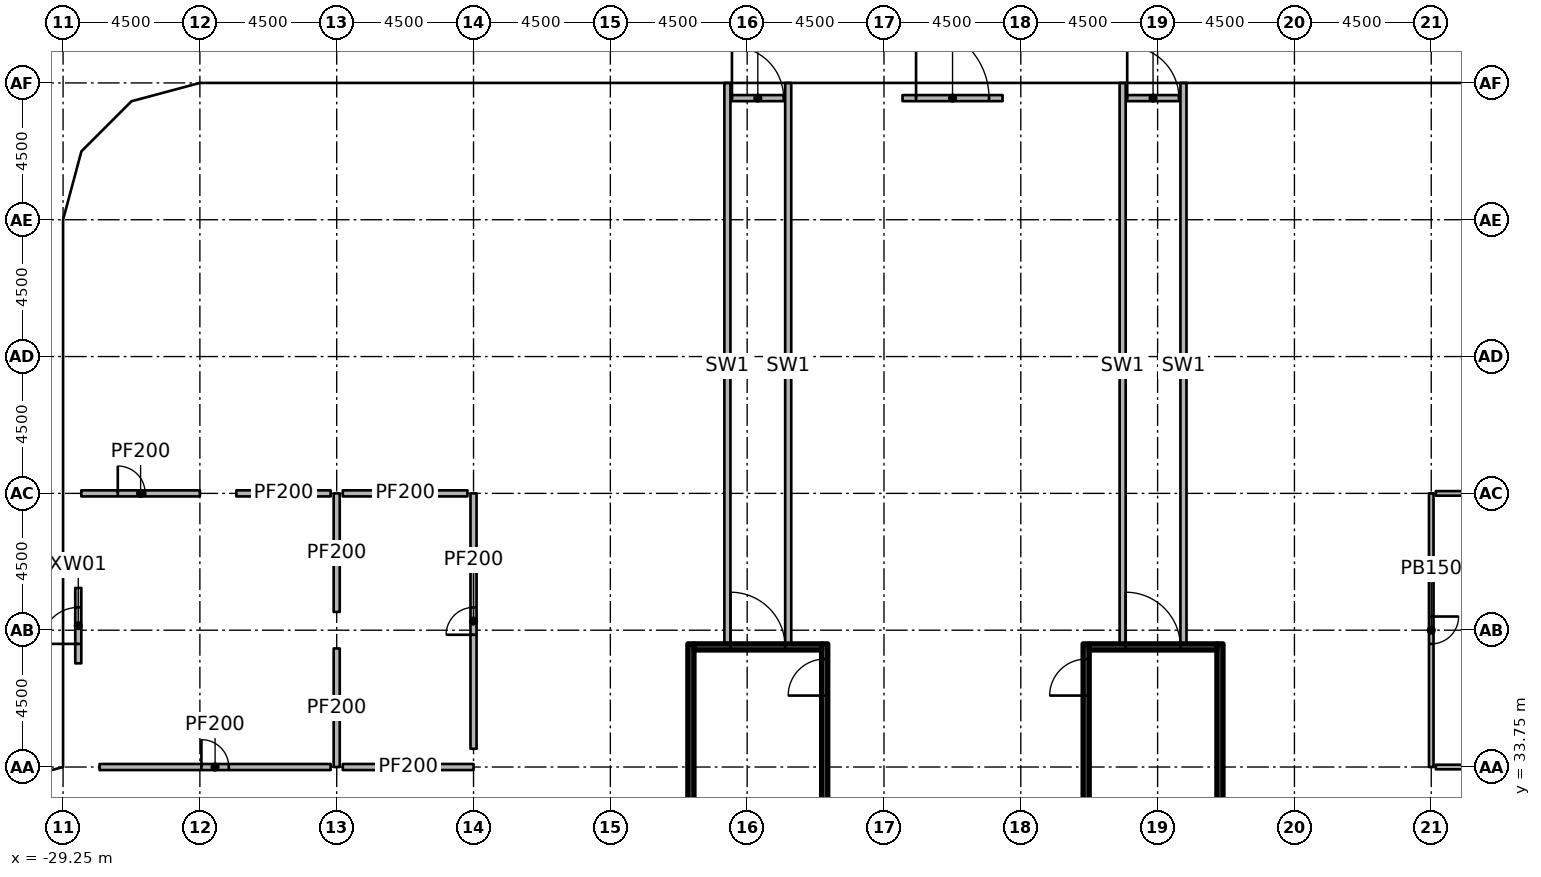
"""IFC4 building model, lengths in metres.
Left out: names, types, materials, properties, quantities, classifications, styles, units other than length and angle.
Written with IfcOpenShell. Run it as: python <this file> out.ifc"""

import sys

from ifc_helpers import new_model, si_unit, direction, frame, frame_2d, origin, origin_2d, place, context, subcontext, project, spatial, rectangle, extrude, element, fill, save


model = new_model("IFC4")
c1 = context("Model", 3, precision=1e-05, world=origin(), true_north=direction((0.0, 1.0)))
c2 = subcontext(c1, "Body", "Model", "MODEL_VIEW")
j1 = project(units=[si_unit("LENGTHUNIT", "METRE"), si_unit("PLANEANGLEUNIT", "RADIAN")], contexts=[c1])
p1 = place(None, origin())
s1 = spatial("IfcSite", under=j1, at=p1, CompositionType="ELEMENT")
p2 = place(p1, origin())
s2 = spatial("IfcBuilding", under=s1, at=p2, CompositionType="ELEMENT")
p3 = place(p2, origin())
s3 = spatial("IfcBuildingStorey", under=s2, at=p3, CompositionType="ELEMENT", Elevation=0.0)
for number, where, z_axis, x_axis in (
    (1, (-28.65, 33.15, 0.0), (0.0, 0.0, 1.0), (1.0, 0.0, 0.0)),
    (2, (-28.65, 47.25, 0.0), (0.0, 0.0, 1.0), (1.0, 0.0, 0.0)),
    (3, (-24.15, 42.75, 0.0), (0.0, 0.0, 1.0), (1.0, 0.0, 0.0)),
    (4, (-24.75, 55.47, 0.0), (0.0, 0.0, 1.0), (1.0, 0.0, 0.0)),
    (5, (-19.65, 38.25, 0.0), (0.0, 0.0, 1.0), (1.0, 0.0, 0.0)),
    (6, (-20.25, 50.97, 0.0), (0.0, 0.0, 1.0), (1.0, 0.0, 0.0)),
    (7, (-15.15, 33.75, 0.0), (0.0, 0.0, 1.0), (1.0, 0.0, 0.0)),
    (8, (-15.75, 46.47, 0.0), (0.0, 0.0, 1.0), (1.0, 0.0, 0.0)),
    (9, (-11.25, 41.97, 0.0), (0.0, 0.0, 1.0), (1.0, 0.0, 0.0)),
    (10, (-11.25, 55.65, 0.0), (0.0, 0.0, 1.0), (1.0, 0.0, 0.0)),
    (11, (-2.25, 33.11, 0.0), (0.0, 0.0, 1.0), (1.0, 0.0, 0.0)),
    (12, (-2.25, 46.65, 0.0), (0.0, 0.0, 1.0), (1.0, 0.0, 0.0)),
    (13, (2.25, 33.11, 0.0), (0.0, 0.0, 1.0), (1.0, 0.0, 0.0)),
    (14, (2.25, 42.15, 0.0), (0.0, 0.0, 1.0), (1.0, 0.0, 0.0)),
    (15, (2.25, 55.65, 0.0), (0.0, 0.0, 1.0), (1.0, 0.0, 0.0)),
    (16, (10.47, 33.75, 0.0), (0.0, 0.0, 1.0), (1.0, 0.0, 0.0)),
    (17, (11.25, 46.65, 0.0), (0.0, 0.0, 1.0), (1.0, 0.0, 0.0)),
    (18, (15.75, 55.65, 0.0), (0.0, 0.0, 1.0), (1.0, 0.0, 0.0)),
):
    element("IfcColumn", number, at=place(p3, frame(where, z_axis=z_axis, x_axis=x_axis)), inside=s3, PredefinedType="COLUMN", context=c2, shape_type="SweptSolid", body=[
        extrude(rectangle(XDim=1.2, YDim=1.2, at=origin_2d()), origin(), (0.0, 0.0, 1.0), 6.55),
    ])
p4 = place(p3, frame((-1.64, 55.75, 0.0), z_axis=(0.0, 0.0, 1.0), x_axis=(1.0, 0.0, 0.0)))
e19 = element("IfcWall", 19, at=p4, inside=s3, PredefinedType="SOLIDWALL", context=c2, shape_type="SweptSolid", body=[
    extrude(rectangle(XDim=3.29, YDim=0.2, at=frame_2d((1.645, 0.0))), origin(), (0.0, 0.0, 1.0), 5.6),
])
p5 = place(p4, frame((0.445, 0.0, 0.0)))
e20 = element("IfcOpeningElement", 20, at=p5, cuts=e19, PredefinedType="OPENING", context=c2, shape_type="SweptSolid", body=[
    extrude(rectangle(XDim=2.4, YDim=2.7, at=frame_2d((1.2, 1.35))), frame((0.0, 0.11, 0.0), z_axis=(0.0, -1.0, 0.0), x_axis=(1.0, 0.0, 0.0)), (0.0, 0.0, 1.0), 0.22),
])
p6 = place(p3, frame((-28.75, 37.16, 0.0), z_axis=(0.0, 0.0, 1.0), x_axis=(0.0, 1.0, 0.0)))
e21 = element("IfcWall", 21, at=p6, inside=s3, PredefinedType="SOLIDWALL", context=c2, shape_type="SweptSolid", body=[
    extrude(rectangle(XDim=2.48, YDim=0.2, at=frame_2d((1.24, 0.0))), origin(), (0.0, 0.0, 1.0), 5.6),
])
p7 = place(p6, frame((0.64, 0.0, 0.0)))
e22 = element("IfcOpeningElement", 22, at=p7, cuts=e21, PredefinedType="OPENING", context=c2, shape_type="SweptSolid", body=[
    extrude(rectangle(XDim=1.2, YDim=2.1, at=frame_2d((0.6, 1.05))), frame((0.0, 0.11, 0.0), z_axis=(0.0, -1.0, 0.0), x_axis=(1.0, 0.0, 0.0)), (0.0, 0.0, 1.0), 0.22),
])
p8 = place(p3, frame((-7.3, 55.75, 0.0), z_axis=(0.0, 0.0, 1.0), x_axis=(1.0, 0.0, 0.0)))
e23 = element("IfcWall", 23, at=p8, inside=s3, PredefinedType="SOLIDWALL", context=c2, shape_type="SweptSolid", body=[
    extrude(rectangle(XDim=1.8, YDim=0.2, at=frame_2d((0.9, 0.0))), origin(), (0.0, 0.0, 1.0), 3.0),
])
p9 = place(p8, frame((0.05, 0.0, 0.0)))
e24 = element("IfcOpeningElement", 24, at=p9, cuts=e23, PredefinedType="OPENING", context=c2, shape_type="SweptSolid", body=[
    extrude(rectangle(XDim=1.7, YDim=2.1, at=frame_2d((0.85, 1.05))), frame((0.0, 0.11, 0.0), z_axis=(0.0, -1.0, 0.0), x_axis=(1.0, 0.0, 0.0)), (0.0, 0.0, 1.0), 0.22),
])
p10 = place(p3, frame((5.7, 55.75, 0.0), z_axis=(0.0, 0.0, 1.0), x_axis=(1.0, 0.0, 0.0)))
e25 = element("IfcWall", 25, at=p10, inside=s3, PredefinedType="SOLIDWALL", context=c2, shape_type="SweptSolid", body=[
    extrude(rectangle(XDim=1.8, YDim=0.2, at=frame_2d((0.9, 0.0))), origin(), (0.0, 0.0, 1.0), 3.0),
])
p11 = place(p10, frame((0.05, 0.0, 0.0)))
e26 = element("IfcOpeningElement", 26, at=p11, cuts=e25, PredefinedType="OPENING", context=c2, shape_type="SweptSolid", body=[
    extrude(rectangle(XDim=1.7, YDim=2.1, at=frame_2d((0.85, 1.05))), frame((0.0, 0.11, 0.0), z_axis=(0.0, -1.0, 0.0), x_axis=(1.0, 0.0, 0.0)), (0.0, 0.0, 1.0), 0.22),
])
p12 = place(p3, frame((-8.6, 29.8, 0.0), z_axis=(0.0, 0.0, 1.0), x_axis=(0.0, 1.0, 0.0)))
e27 = element("IfcWall", 27, at=p12, inside=s3, PredefinedType="SHEAR", context=c2, shape_type="SweptSolid", body=[
    extrude(rectangle(XDim=8.0, YDim=0.2, at=frame_2d((4.0, 0.0))), origin(), (0.0, 0.0, 1.0), 6.55),
])
p13 = place(p3, frame((-4.2, 29.8, 0.0), z_axis=(0.0, 0.0, 1.0), x_axis=(0.0, 1.0, 0.0)))
e28 = element("IfcWall", 28, at=p13, inside=s3, PredefinedType="SHEAR", context=c2, shape_type="SweptSolid", body=[
    extrude(rectangle(XDim=8.0, YDim=0.2, at=frame_2d((4.0, 0.0))), origin(), (0.0, 0.0, 1.0), 6.55),
])
p14 = place(p13, frame((6.3, 0.0, 0.0)))
e29 = element("IfcOpeningElement", 29, at=p14, cuts=e28, PredefinedType="OPENING", context=c2, shape_type="SweptSolid", body=[
    extrude(rectangle(XDim=1.2, YDim=2.1, at=frame_2d((0.6, 1.05))), frame((0.0, 0.11, 0.0), z_axis=(0.0, -1.0, 0.0), x_axis=(1.0, 0.0, 0.0)), (0.0, 0.0, 1.0), 0.22),
])
p15 = place(p3, frame((-8.5, 37.7, 0.0), z_axis=(0.0, 0.0, 1.0), x_axis=(1.0, 0.0, 0.0)))
e30 = element("IfcWall", 30, at=p15, inside=s3, PredefinedType="SHEAR", context=c2, shape_type="SweptSolid", body=[
    extrude(rectangle(XDim=4.2, YDim=0.2, at=frame_2d((2.1, 0.0))), origin(), (0.0, 0.0, 1.0), 6.55),
])
p16 = place(p15, frame((1.2, 0.0, 0.0)))
e31 = element("IfcOpeningElement", 31, at=p16, cuts=e30, PredefinedType="OPENING", context=c2, shape_type="SweptSolid", body=[
    extrude(rectangle(XDim=1.8, YDim=2.1, at=frame_2d((0.9, 1.05))), frame((0.0, 0.11, 0.0), z_axis=(0.0, -1.0, 0.0), x_axis=(1.0, 0.0, 0.0)), (0.0, 0.0, 1.0), 0.22),
])
for number, where, z_axis, x_axis in (
    (32, (-7.4, 37.6, 0.0), (0.0, 0.0, 1.0), (0.0, 1.0, 0.0)),
    (33, (-5.4, 37.6, 0.0), (0.0, 0.0, 1.0), (0.0, 1.0, 0.0)),
):
    element("IfcWall", number, at=place(p3, frame(where, z_axis=z_axis, x_axis=x_axis)), inside=s3, PredefinedType="PARTITIONING", context=c2, shape_type="SweptSolid", body=[
        extrude(rectangle(XDim=18.65, YDim=0.2, at=frame_2d((9.325, 0.0))), origin(), (0.0, 0.0, 1.0), 6.55),
    ])
p17 = place(p3, frame((4.4, 29.8, 0.0), z_axis=(0.0, 0.0, 1.0), x_axis=(0.0, 1.0, 0.0)))
e34 = element("IfcWall", 34, at=p17, inside=s3, PredefinedType="SHEAR", context=c2, shape_type="SweptSolid", body=[
    extrude(rectangle(XDim=8.0, YDim=0.2, at=frame_2d((4.0, 0.0))), origin(), (0.0, 0.0, 1.0), 6.55),
])
p18 = place(p17, frame((6.3, 0.0, 0.0)))
e35 = element("IfcOpeningElement", 35, at=p18, cuts=e34, PredefinedType="OPENING", context=c2, shape_type="SweptSolid", body=[
    extrude(rectangle(XDim=1.2, YDim=2.1, at=frame_2d((0.6, 1.05))), frame((0.0, 0.11, 0.0), z_axis=(0.0, -1.0, 0.0), x_axis=(1.0, 0.0, 0.0)), (0.0, 0.0, 1.0), 0.22),
])
p19 = place(p3, frame((8.8, 29.8, 0.0), z_axis=(0.0, 0.0, 1.0), x_axis=(0.0, 1.0, 0.0)))
e36 = element("IfcWall", 36, at=p19, inside=s3, PredefinedType="SHEAR", context=c2, shape_type="SweptSolid", body=[
    extrude(rectangle(XDim=8.0, YDim=0.2, at=frame_2d((4.0, 0.0))), origin(), (0.0, 0.0, 1.0), 6.55),
])
p20 = place(p3, frame((4.5, 37.7, 0.0), z_axis=(0.0, 0.0, 1.0), x_axis=(1.0, 0.0, 0.0)))
e37 = element("IfcWall", 37, at=p20, inside=s3, PredefinedType="SHEAR", context=c2, shape_type="SweptSolid", body=[
    extrude(rectangle(XDim=4.2, YDim=0.2, at=frame_2d((2.1, 0.0))), origin(), (0.0, 0.0, 1.0), 6.55),
])
p21 = place(p20, frame((1.2, 0.0, 0.0)))
e38 = element("IfcOpeningElement", 38, at=p21, cuts=e37, PredefinedType="OPENING", context=c2, shape_type="SweptSolid", body=[
    extrude(rectangle(XDim=1.8, YDim=2.1, at=frame_2d((0.9, 1.05))), frame((0.0, 0.11, 0.0), z_axis=(0.0, -1.0, 0.0), x_axis=(1.0, 0.0, 0.0)), (0.0, 0.0, 1.0), 0.22),
])
for number, where, z_axis, x_axis in (
    (39, (5.6, 37.6, 0.0), (0.0, 0.0, 1.0), (0.0, 1.0, 0.0)),
    (40, (7.6, 37.6, 0.0), (0.0, 0.0, 1.0), (0.0, 1.0, 0.0)),
):
    element("IfcWall", number, at=place(p3, frame(where, z_axis=z_axis, x_axis=x_axis)), inside=s3, PredefinedType="PARTITIONING", context=c2, shape_type="SweptSolid", body=[
        extrude(rectangle(XDim=18.65, YDim=0.2, at=frame_2d((9.325, 0.0))), origin(), (0.0, 0.0, 1.0), 6.55),
    ])
p22 = place(p3, frame((-15.75, 34.35, 0.0), z_axis=(0.0, 0.0, 1.0), x_axis=(0.0, 1.0, 0.0)))
e41 = element("IfcWall", 41, at=p22, inside=s3, PredefinedType="PARTITIONING", context=c2, shape_type="SweptSolid", body=[
    extrude(rectangle(XDim=8.4, YDim=0.2, at=frame_2d((4.2, 0.0))), origin(), (0.0, 0.0, 1.0), 6.55),
])
p23 = place(p22, frame((3.75, 0.0, 0.0)))
e42 = element("IfcOpeningElement", 42, at=p23, cuts=e41, PredefinedType="OPENING", context=c2, shape_type="SweptSolid", body=[
    extrude(rectangle(XDim=0.9, YDim=2.1, at=frame_2d((0.45, 1.05))), frame((0.0, 0.11, 0.0), z_axis=(0.0, -1.0, 0.0), x_axis=(1.0, 0.0, 0.0)), (0.0, 0.0, 1.0), 0.22),
])
p24 = place(p3, frame((15.75, 42.75, 0.0), z_axis=(0.0, 0.0, 1.0), x_axis=(0.0, -1.0, 0.0)))
e43 = element("IfcWall", 43, at=p24, inside=s3, PredefinedType="PARTITIONING", context=c2, shape_type="SweptSolid", body=[
    extrude(rectangle(XDim=9.0, YDim=0.15, at=frame_2d((4.5, 0.0))), origin(), (0.0, 0.0, 1.0), 6.55),
])
p25 = place(p24, frame((4.05, 0.0, 0.0)))
e44 = element("IfcOpeningElement", 44, at=p25, cuts=e43, PredefinedType="OPENING", context=c2, shape_type="SweptSolid", body=[
    extrude(rectangle(XDim=0.9, YDim=2.1, at=frame_2d((0.45, 1.05))), frame((0.0, 0.085, 0.0), z_axis=(0.0, -1.0, 0.0), x_axis=(1.0, 0.0, 0.0)), (0.0, 0.0, 1.0), 0.17),
])
for number, where, z_axis, x_axis in (
    (45, (-20.25, 42.75, 0.0), (0.0, 0.0, 1.0), (0.0, -1.0, 0.0)),
    (46, (-20.25, 37.65, 0.0), (0.0, 0.0, 1.0), (0.0, -1.0, 0.0)),
):
    element("IfcWall", number, at=place(p3, frame(where, z_axis=z_axis, x_axis=x_axis)), inside=s3, PredefinedType="PARTITIONING", context=c2, shape_type="SweptSolid", body=[
        extrude(rectangle(XDim=3.9, YDim=0.2, at=frame_2d((1.95, 0.0))), origin(), (0.0, 0.0, 1.0), 6.55),
    ])
p26 = place(p3, frame((-28.65, 42.75, 0.0), z_axis=(0.0, 0.0, 1.0), x_axis=(1.0, 0.0, 0.0)))
e47 = element("IfcWall", 47, at=p26, inside=s3, PredefinedType="PARTITIONING", context=c2, shape_type="SweptSolid", body=[
    extrude(rectangle(XDim=3.9, YDim=0.2, at=frame_2d((1.95, 0.0))), origin(), (0.0, 0.0, 1.0), 6.55),
])
p27 = place(p26, frame((1.2, 0.0, 0.0)))
e48 = element("IfcOpeningElement", 48, at=p27, cuts=e47, PredefinedType="OPENING", context=c2, shape_type="SweptSolid", body=[
    extrude(rectangle(XDim=0.9, YDim=2.1, at=frame_2d((0.45, 1.05))), frame((0.0, 0.11, 0.0), z_axis=(0.0, -1.0, 0.0), x_axis=(1.0, 0.0, 0.0)), (0.0, 0.0, 1.0), 0.22),
])
p28 = place(p3, frame((-23.55, 42.75, 0.0), z_axis=(0.0, 0.0, 1.0), x_axis=(1.0, 0.0, 0.0)))
e49 = element("IfcWall", 49, at=p28, inside=s3, PredefinedType="PARTITIONING", context=c2, shape_type="SweptSolid", body=[
    extrude(rectangle(XDim=3.1, YDim=0.2, at=frame_2d((1.55, 0.0))), origin(), (0.0, 0.0, 1.0), 6.55),
])
p29 = place(p3, frame((-28.05, 33.75, 0.0), z_axis=(0.0, 0.0, 1.0), x_axis=(1.0, 0.0, 0.0)))
e50 = element("IfcWall", 50, at=p29, inside=s3, PredefinedType="PARTITIONING", context=c2, shape_type="SweptSolid", body=[
    extrude(rectangle(XDim=7.6, YDim=0.2, at=frame_2d((3.8, 0.0))), origin(), (0.0, 0.0, 1.0), 6.55),
])
p30 = place(p29, frame((3.35, 0.0, 0.0)))
e51 = element("IfcOpeningElement", 51, at=p30, cuts=e50, PredefinedType="OPENING", context=c2, shape_type="SweptSolid", body=[
    extrude(rectangle(XDim=0.9, YDim=2.1, at=frame_2d((0.45, 1.05))), frame((0.0, 0.11, 0.0), z_axis=(0.0, -1.0, 0.0), x_axis=(1.0, 0.0, 0.0)), (0.0, 0.0, 1.0), 0.22),
])
p31 = place(p3, frame((-20.05, 42.75, 0.0), z_axis=(0.0, 0.0, 1.0), x_axis=(1.0, 0.0, 0.0)))
e52 = element("IfcWall", 52, at=p31, inside=s3, PredefinedType="PARTITIONING", context=c2, shape_type="SweptSolid", body=[
    extrude(rectangle(XDim=4.1, YDim=0.2, at=frame_2d((2.05, 0.0))), origin(), (0.0, 0.0, 1.0), 6.55),
])
p32 = place(p3, frame((-15.75, 33.75, 0.0), z_axis=(0.0, 0.0, 1.0), x_axis=(-1.0, 0.0, 0.0)))
e53 = element("IfcWall", 53, at=p32, inside=s3, PredefinedType="PARTITIONING", context=c2, shape_type="SweptSolid", body=[
    extrude(rectangle(XDim=4.3, YDim=0.2, at=frame_2d((2.15, 0.0))), origin(), (0.0, 0.0, 1.0), 6.55),
])
p33 = place(p3, frame((15.9, 42.75, 0.0), z_axis=(0.0, 0.0, 1.0), x_axis=(1.0, 0.0, 0.0)))
e54 = element("IfcWall", 54, at=p33, inside=s3, PredefinedType="PARTITIONING", context=c2, shape_type="SweptSolid", body=[
    extrude(rectangle(XDim=12.15, YDim=0.15, at=frame_2d((6.075, 0.0))), origin(), (0.0, 0.0, 1.0), 6.55),
])
p34 = place(p33, frame((5.625, 0.0, 0.0)))
e55 = element("IfcOpeningElement", 55, at=p34, cuts=e54, PredefinedType="OPENING", context=c2, shape_type="SweptSolid", body=[
    extrude(rectangle(XDim=0.9, YDim=2.1, at=frame_2d((0.45, 1.05))), frame((0.0, 0.085, 0.0), z_axis=(0.0, -1.0, 0.0), x_axis=(1.0, 0.0, 0.0)), (0.0, 0.0, 1.0), 0.17),
])
p35 = place(p3, frame((23.55, 33.75, 0.0), z_axis=(0.0, 0.0, 1.0), x_axis=(-1.0, 0.0, 0.0)))
e56 = element("IfcWall", 56, at=p35, inside=s3, PredefinedType="PARTITIONING", context=c2, shape_type="SweptSolid", body=[
    extrude(rectangle(XDim=7.65, YDim=0.15, at=frame_2d((3.825, 0.0))), origin(), (0.0, 0.0, 1.0), 6.55),
])
p36 = place(p5, origin())
e57 = element("IfcDoor", 57, at=p36, inside=s3, OperationType="SINGLE_SWING_LEFT", PredefinedType="DOOR", context=c2, shape_type="SweptSolid", body=[
    extrude(rectangle(XDim=2.4, YDim=2.7, at=frame_2d((1.2, 1.35))), frame((0.0, 0.025, 0.0), z_axis=(0.0, -1.0, 0.0), x_axis=(1.0, 0.0, 0.0)), (0.0, 0.0, 1.0), 0.05),
])
fill(e20, e57)
p37 = place(p7, origin())
e58 = element("IfcDoor", 58, at=p37, inside=s3, OperationType="SINGLE_SWING_LEFT", PredefinedType="DOOR", context=c2, shape_type="SweptSolid", body=[
    extrude(rectangle(XDim=1.2, YDim=2.1, at=frame_2d((0.6, 1.05))), frame((0.0, 0.025, 0.0), z_axis=(0.0, -1.0, 0.0), x_axis=(1.0, 0.0, 0.0)), (0.0, 0.0, 1.0), 0.05),
])
fill(e22, e58)
p38 = place(p9, origin())
e59 = element("IfcDoor", 59, at=p38, inside=s3, OperationType="SINGLE_SWING_LEFT", PredefinedType="DOOR", context=c2, shape_type="SweptSolid", body=[
    extrude(rectangle(XDim=1.7, YDim=2.1, at=frame_2d((0.85, 1.05))), frame((0.0, 0.025, 0.0), z_axis=(0.0, -1.0, 0.0), x_axis=(1.0, 0.0, 0.0)), (0.0, 0.0, 1.0), 0.05),
])
fill(e24, e59)
p39 = place(p11, origin())
e60 = element("IfcDoor", 60, at=p39, inside=s3, OperationType="SINGLE_SWING_LEFT", PredefinedType="DOOR", context=c2, shape_type="SweptSolid", body=[
    extrude(rectangle(XDim=1.7, YDim=2.1, at=frame_2d((0.85, 1.05))), frame((0.0, 0.025, 0.0), z_axis=(0.0, -1.0, 0.0), x_axis=(1.0, 0.0, 0.0)), (0.0, 0.0, 1.0), 0.05),
])
fill(e26, e60)
p40 = place(p14, origin())
e61 = element("IfcDoor", 61, at=p40, inside=s3, OperationType="SINGLE_SWING_RIGHT", PredefinedType="DOOR", context=c2, shape_type="SweptSolid", body=[
    extrude(rectangle(XDim=1.2, YDim=2.1, at=frame_2d((0.6, 1.05))), frame((0.0, 0.025, 0.0), z_axis=(0.0, -1.0, 0.0), x_axis=(1.0, 0.0, 0.0)), (0.0, 0.0, 1.0), 0.05),
])
fill(e29, e61)
p41 = place(p16, origin())
e62 = element("IfcDoor", 62, at=p41, inside=s3, OperationType="DOUBLE_DOOR_SINGLE_SWING", PredefinedType="DOOR", context=c2, shape_type="SweptSolid", body=[
    extrude(rectangle(XDim=1.8, YDim=2.1, at=frame_2d((0.9, 1.05))), frame((0.0, 0.025, 0.0), z_axis=(0.0, -1.0, 0.0), x_axis=(1.0, 0.0, 0.0)), (0.0, 0.0, 1.0), 0.05),
])
fill(e31, e62)
p42 = place(p18, origin())
e63 = element("IfcDoor", 63, at=p42, inside=s3, OperationType="SINGLE_SWING_LEFT", PredefinedType="DOOR", context=c2, shape_type="SweptSolid", body=[
    extrude(rectangle(XDim=1.2, YDim=2.1, at=frame_2d((0.6, 1.05))), frame((0.0, 0.025, 0.0), z_axis=(0.0, -1.0, 0.0), x_axis=(1.0, 0.0, 0.0)), (0.0, 0.0, 1.0), 0.05),
])
fill(e35, e63)
p43 = place(p21, origin())
e64 = element("IfcDoor", 64, at=p43, inside=s3, OperationType="DOUBLE_DOOR_SINGLE_SWING", PredefinedType="DOOR", context=c2, shape_type="SweptSolid", body=[
    extrude(rectangle(XDim=1.8, YDim=2.1, at=frame_2d((0.9, 1.05))), frame((0.0, 0.025, 0.0), z_axis=(0.0, -1.0, 0.0), x_axis=(1.0, 0.0, 0.0)), (0.0, 0.0, 1.0), 0.05),
])
fill(e38, e64)
p44 = place(p23, origin())
e65 = element("IfcDoor", 65, at=p44, inside=s3, OperationType="SINGLE_SWING_LEFT", PredefinedType="DOOR", context=c2, shape_type="SweptSolid", body=[
    extrude(rectangle(XDim=0.9, YDim=2.1, at=frame_2d((0.45, 1.05))), frame((0.0, 0.025, 0.0), z_axis=(0.0, -1.0, 0.0), x_axis=(1.0, 0.0, 0.0)), (0.0, 0.0, 1.0), 0.05),
])
fill(e42, e65)
p45 = place(p25, origin())
e66 = element("IfcDoor", 66, at=p45, inside=s3, OperationType="SINGLE_SWING_LEFT", PredefinedType="DOOR", context=c2, shape_type="SweptSolid", body=[
    extrude(rectangle(XDim=0.9, YDim=2.1, at=frame_2d((0.45, 1.05))), frame((0.0, 0.025, 0.0), z_axis=(0.0, -1.0, 0.0), x_axis=(1.0, 0.0, 0.0)), (0.0, 0.0, 1.0), 0.05),
])
fill(e44, e66)
p46 = place(p27, origin())
e67 = element("IfcDoor", 67, at=p46, inside=s3, OperationType="SINGLE_SWING_LEFT", PredefinedType="DOOR", context=c2, shape_type="SweptSolid", body=[
    extrude(rectangle(XDim=0.9, YDim=2.1, at=frame_2d((0.45, 1.05))), frame((0.0, 0.025, 0.0), z_axis=(0.0, -1.0, 0.0), x_axis=(1.0, 0.0, 0.0)), (0.0, 0.0, 1.0), 0.05),
])
fill(e48, e67)
p47 = place(p30, origin())
e68 = element("IfcDoor", 68, at=p47, inside=s3, OperationType="SINGLE_SWING_LEFT", PredefinedType="DOOR", context=c2, shape_type="SweptSolid", body=[
    extrude(rectangle(XDim=0.9, YDim=2.1, at=frame_2d((0.45, 1.05))), frame((0.0, 0.025, 0.0), z_axis=(0.0, -1.0, 0.0), x_axis=(1.0, 0.0, 0.0)), (0.0, 0.0, 1.0), 0.05),
])
fill(e51, e68)
save(model, sys.argv[1])
